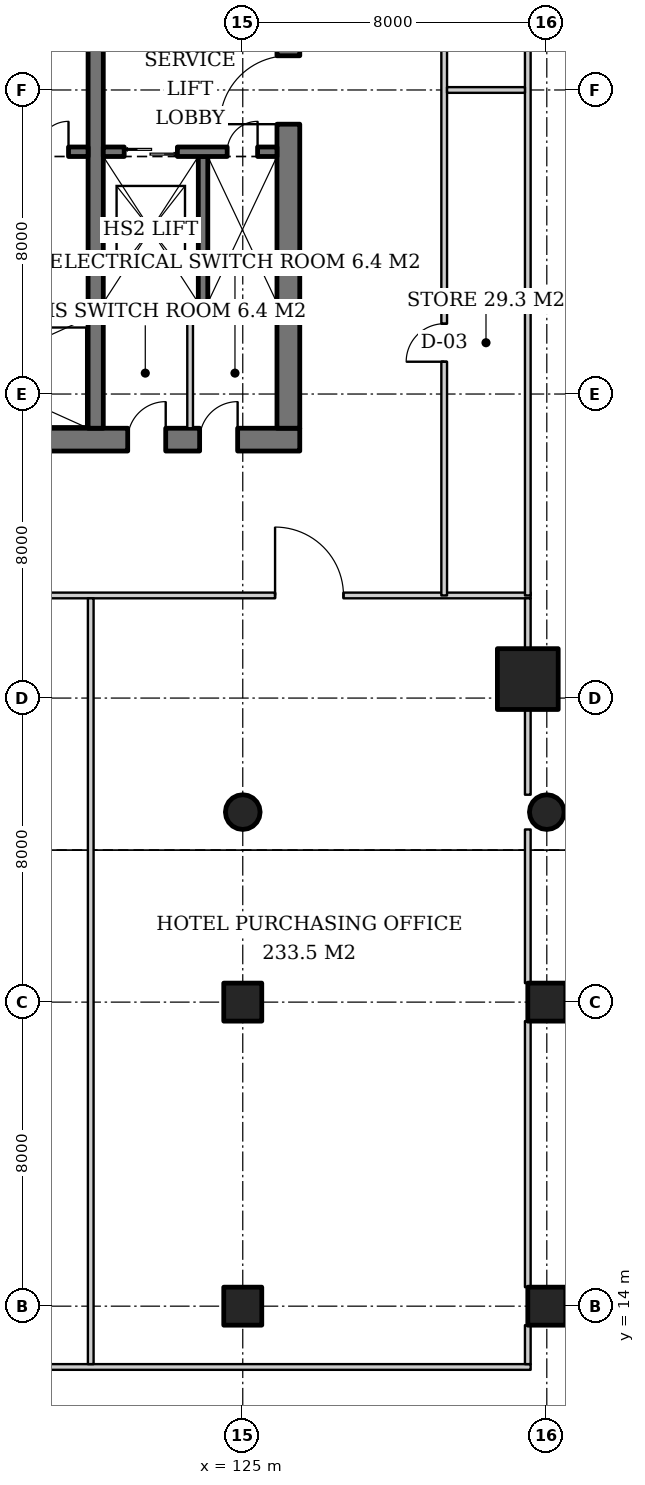
"""IFC4 building model, lengths in metres.
Left out: names, types, materials, properties, quantities, classifications, styles, units other than length and angle.
Written with IfcOpenShell. Run it as: python <this file> out.ifc"""

import sys

from ifc_helpers import new_model, si_unit, direction, frame, frame_2d, origin, origin_2d, place, context, subcontext, project, spatial, rectangle, hollow_circle, extrude, element, fill, save


model = new_model("IFC4")
c1 = context("Model", 3, precision=1e-05, world=origin(), true_north=direction((0.0, 1.0)))
c2 = subcontext(c1, "Body", "Model", "MODEL_VIEW")
j1 = project(units=[si_unit("LENGTHUNIT", "METRE"), si_unit("PLANEANGLEUNIT", "RADIAN")], contexts=[c1])
p1 = place(None, origin())
s1 = spatial("IfcSite", under=j1, at=p1, CompositionType="ELEMENT")
p2 = place(p1, origin())
s2 = spatial("IfcBuilding", under=s1, at=p2, CompositionType="ELEMENT")
p3 = place(p2, frame((0.0, 0.0, -5.0)))
s3 = spatial("IfcBuildingStorey", under=s2, at=p3, CompositionType="ELEMENT", Elevation=-5.0)
for number, where, z_axis, x_axis in (
    (1, (125.0, 14.0, 0.0), (0.0, 0.0, 1.0), (1.0, 0.0, 0.0)),
    (2, (125.0, 22.0, 0.0), (0.0, 0.0, 1.0), (1.0, 0.0, 0.0)),
    (3, (133.0, 14.0, 0.0), (0.0, 0.0, 1.0), (1.0, 0.0, 0.0)),
    (4, (133.0, 22.0, 0.0), (0.0, 0.0, 1.0), (1.0, 0.0, 0.0)),
):
    element("IfcColumn", number, at=place(p3, frame(where, z_axis=z_axis, x_axis=x_axis)), inside=s3, PredefinedType="COLUMN", context=c2, shape_type="SweptSolid", body=[
        extrude(rectangle(XDim=1.0, YDim=1.0, at=origin_2d()), origin(), (0.0, 0.0, 1.0), 5.0),
    ])
p4 = place(p3, frame((132.5, 30.5, 0.0), z_axis=(0.0, 0.0, 1.0), x_axis=(1.0, 0.0, 0.0)))
e5 = element("IfcColumn", 5, at=p4, inside=s3, PredefinedType="COLUMN", context=c2, shape_type="SweptSolid", body=[
    extrude(rectangle(XDim=1.6, YDim=1.6, at=origin_2d()), origin(), (0.0, 0.0, 1.0), 5.0),
])
for number, where, z_axis, x_axis in (
    (6, (133.0, 27.0, 0.0), (0.0, 0.0, 1.0), (1.0, 0.0, 0.0)),
    (7, (125.0, 27.0, 0.0), (0.0, 0.0, 1.0), (1.0, 0.0, 0.0)),
):
    element("IfcColumn", number, at=place(p3, frame(where, z_axis=z_axis, x_axis=x_axis)), inside=s3, PredefinedType="COLUMN", context=c2, shape_type="SweptSolid", body=[
        extrude(hollow_circle(Radius=0.457, WallThickness=0.03, at=origin_2d()), origin(), (0.0, 0.0, 1.0), 5.0),
    ])
p5 = place(p3, frame((107.5, 36.8, 0.0), z_axis=(0.0, 0.0, 1.0), x_axis=(1.0, 0.0, 0.0)))
e8 = element("IfcWall", 8, at=p5, inside=s3, PredefinedType="SHEAR", context=c2, shape_type="SweptSolid", body=[
    extrude(rectangle(XDim=19.0, YDim=0.6, at=frame_2d((9.5, 0.0))), origin(), (0.0, 0.0, 1.0), 5.0),
])
p6 = place(p5, frame((3.9, 0.0, 0.0)))
e9 = element("IfcOpeningElement", 9, at=p6, cuts=e8, PredefinedType="OPENING", context=c2, shape_type="SweptSolid", body=[
    extrude(rectangle(XDim=1.0, YDim=2.1, at=frame_2d((0.5, 1.05))), frame((0.0, 0.31, 0.0), z_axis=(0.0, -1.0, 0.0), x_axis=(1.0, 0.0, 0.0)), (0.0, 0.0, 1.0), 0.62),
])
p7 = place(p5, frame((14.472, 0.0, 0.0)))
e10 = element("IfcOpeningElement", 10, at=p7, cuts=e8, PredefinedType="OPENING", context=c2, shape_type="SweptSolid", body=[
    extrude(rectangle(XDim=1.0, YDim=2.1, at=frame_2d((0.5, 1.05))), frame((0.0, 0.31, 0.0), z_axis=(0.0, -1.0, 0.0), x_axis=(1.0, 0.0, 0.0)), (0.0, 0.0, 1.0), 0.62),
])
p8 = place(p5, frame((16.365, 0.0, 0.0)))
e11 = element("IfcOpeningElement", 11, at=p8, cuts=e8, PredefinedType="OPENING", context=c2, shape_type="SweptSolid", body=[
    extrude(rectangle(XDim=1.0, YDim=2.1, at=frame_2d((0.5, 1.05))), frame((0.0, 0.31, 0.0), z_axis=(0.0, -1.0, 0.0), x_axis=(1.0, 0.0, 0.0)), (0.0, 0.0, 1.0), 0.62),
])
p9 = place(p3, frame((126.2, 37.1, 0.0), z_axis=(0.0, 0.0, 1.0), x_axis=(0.0, 1.0, 0.0)))
e12 = element("IfcWall", 12, at=p9, inside=s3, PredefinedType="SHEAR", context=c2, shape_type="SweptSolid", body=[
    extrude(rectangle(XDim=17.8, YDim=0.6, at=frame_2d((8.9, 0.0))), origin(), (0.0, 0.0, 1.0), 5.0),
])
p10 = place(p9, frame((8.0, 0.0, 0.0)))
e13 = element("IfcOpeningElement", 13, at=p10, cuts=e12, PredefinedType="OPENING", context=c2, shape_type="SweptSolid", body=[
    extrude(rectangle(XDim=1.8, YDim=2.4, at=frame_2d((0.9, 1.2))), frame((0.0, 0.31, 0.0), z_axis=(0.0, -1.0, 0.0), x_axis=(1.0, 0.0, 0.0)), (0.0, 0.0, 1.0), 0.62),
])
p11 = place(p3, frame((108.1, 40.2, 0.0), z_axis=(0.0, 0.0, 1.0), x_axis=(1.0, 0.0, 0.0)))
e14 = element("IfcWall", 14, at=p11, inside=s3, PredefinedType="SHEAR", context=c2, shape_type="SweptSolid", body=[
    extrude(rectangle(XDim=17.8, YDim=0.4, at=frame_2d((8.9, 0.0))), origin(), (0.0, 0.0, 1.0), 5.0),
])
p12 = place(p3, frame((121.13, 37.1, 0.0), z_axis=(0.0, 0.0, 1.0), x_axis=(0.0, 1.0, 0.0)))
e15 = element("IfcWall", 15, at=p12, inside=s3, PredefinedType="SHEAR", context=c2, shape_type="SweptSolid", body=[
    extrude(rectangle(XDim=2.9, YDim=0.4, at=frame_2d((1.45, 0.0))), origin(), (0.0, 0.0, 1.0), 5.0),
])
p13 = place(p3, frame((121.13, 40.4, 0.0), z_axis=(0.0, 0.0, 1.0), x_axis=(0.0, 1.0, 0.0)))
e16 = element("IfcWall", 16, at=p13, inside=s3, PredefinedType="SHEAR", context=c2, shape_type="SweptSolid", body=[
    extrude(rectangle(XDim=11.2, YDim=0.4, at=frame_2d((5.6, 0.0))), origin(), (0.0, 0.0, 1.0), 5.0),
])
p14 = place(p3, frame((108.1, 44.375, 0.0), z_axis=(0.0, 0.0, 1.0), x_axis=(1.0, 0.0, 0.0)))
e17 = element("IfcWall", 17, at=p14, inside=s3, PredefinedType="SHEAR", context=c2, shape_type="SweptSolid", body=[
    extrude(rectangle(XDim=12.83, YDim=0.25, at=frame_2d((6.415, 0.0))), origin(), (0.0, 0.0, 1.0), 5.0),
])
p15 = place(p14, frame((0.7, 0.0, 0.0)))
e18 = element("IfcOpeningElement", 18, at=p15, cuts=e17, PredefinedType="OPENING", context=c2, shape_type="SweptSolid", body=[
    extrude(rectangle(XDim=1.1, YDim=2.2, at=frame_2d((0.55, 1.1))), frame((0.0, 0.135, 0.0), z_axis=(0.0, -1.0, 0.0), x_axis=(1.0, 0.0, 0.0)), (0.0, 0.0, 1.0), 0.27),
])
p16 = place(p14, frame((3.45, 0.0, 0.0)))
e19 = element("IfcOpeningElement", 19, at=p16, cuts=e17, PredefinedType="OPENING", context=c2, shape_type="SweptSolid", body=[
    extrude(rectangle(XDim=1.1, YDim=2.2, at=frame_2d((0.55, 1.1))), frame((0.0, 0.135, 0.0), z_axis=(0.0, -1.0, 0.0), x_axis=(1.0, 0.0, 0.0)), (0.0, 0.0, 1.0), 0.27),
])
p17 = place(p14, frame((6.2, 0.0, 0.0)))
e20 = element("IfcOpeningElement", 20, at=p17, cuts=e17, PredefinedType="OPENING", context=c2, shape_type="SweptSolid", body=[
    extrude(rectangle(XDim=1.1, YDim=2.2, at=frame_2d((0.55, 1.1))), frame((0.0, 0.135, 0.0), z_axis=(0.0, -1.0, 0.0), x_axis=(1.0, 0.0, 0.0)), (0.0, 0.0, 1.0), 0.27),
])
p18 = place(p14, frame((9.0, 0.0, 0.0)))
e21 = element("IfcOpeningElement", 21, at=p18, cuts=e17, PredefinedType="OPENING", context=c2, shape_type="SweptSolid", body=[
    extrude(rectangle(XDim=1.0, YDim=2.1, at=frame_2d((0.5, 1.05))), frame((0.0, 0.135, 0.0), z_axis=(0.0, -1.0, 0.0), x_axis=(1.0, 0.0, 0.0)), (0.0, 0.0, 1.0), 0.27),
])
p19 = place(p14, frame((11.515, 0.0, 0.0)))
e22 = element("IfcOpeningElement", 22, at=p19, cuts=e17, PredefinedType="OPENING", context=c2, shape_type="SweptSolid", body=[
    extrude(rectangle(XDim=0.8, YDim=2.0, at=frame_2d((0.4, 1.0))), frame((0.0, 0.135, 0.0), z_axis=(0.0, -1.0, 0.0), x_axis=(1.0, 0.0, 0.0)), (0.0, 0.0, 1.0), 0.27),
])
p20 = place(p3, frame((123.955, 44.25, 0.0), z_axis=(0.0, 0.0, 1.0), x_axis=(0.0, -1.0, 0.0)))
e23 = element("IfcWall", 23, at=p20, inside=s3, PredefinedType="SHEAR", context=c2, shape_type="SweptSolid", body=[
    extrude(rectangle(XDim=3.85, YDim=0.25, at=frame_2d((1.925, 0.0))), origin(), (0.0, 0.0, 1.0), 5.0),
])
p21 = place(p3, frame((121.33, 44.375, 0.0), z_axis=(0.0, 0.0, 1.0), x_axis=(1.0, 0.0, 0.0)))
e24 = element("IfcWall", 24, at=p21, inside=s3, PredefinedType="SHEAR", context=c2, shape_type="SweptSolid", body=[
    extrude(rectangle(XDim=4.57, YDim=0.25, at=frame_2d((2.285, 0.0))), origin(), (0.0, 0.0, 1.0), 5.0),
])
p22 = place(p21, frame((0.55, 0.0, 0.0)))
e25 = element("IfcOpeningElement", 25, at=p22, cuts=e24, PredefinedType="OPENING", context=c2, shape_type="SweptSolid", body=[
    extrude(rectangle(XDim=1.4, YDim=2.4, at=frame_2d((0.7, 1.2))), frame((0.0, 0.135, 0.0), z_axis=(0.0, -1.0, 0.0), x_axis=(1.0, 0.0, 0.0)), (0.0, 0.0, 1.0), 0.27),
])
p23 = place(p21, frame((3.26, 0.0, 0.0)))
e26 = element("IfcOpeningElement", 26, at=p23, cuts=e24, PredefinedType="OPENING", context=c2, shape_type="SweptSolid", body=[
    extrude(rectangle(XDim=0.8, YDim=2.0, at=frame_2d((0.4, 1.0))), frame((0.0, 0.135, 0.0), z_axis=(0.0, -1.0, 0.0), x_axis=(1.0, 0.0, 0.0)), (0.0, 0.0, 1.0), 0.27),
])
p24 = place(p3, frame((123.615, 37.1, 0.0), z_axis=(0.0, 0.0, 1.0), x_axis=(0.0, 1.0, 0.0)))
e27 = element("IfcWall", 27, at=p24, inside=s3, PredefinedType="SOLIDWALL", context=c2, shape_type="SweptSolid", body=[
    extrude(rectangle(XDim=2.9, YDim=0.15, at=frame_2d((1.45, 0.0))), origin(), (0.0, 0.0, 1.0), 4.7),
])
p25 = place(p3, frame((97.425, 12.4, 0.0), z_axis=(0.0, 0.0, 1.0), x_axis=(1.0, 0.0, 0.0)))
e28 = element("IfcWall", 28, at=p25, inside=s3, PredefinedType="PARTITIONING", context=c2, shape_type="SweptSolid", body=[
    extrude(rectangle(XDim=35.15, YDim=0.15, at=frame_2d((17.575, 0.0))), origin(), (0.0, 0.0, 1.0), 4.6),
])
p26 = place(p3, frame((97.425, 32.7, 0.0), z_axis=(0.0, 0.0, 1.0), x_axis=(1.0, 0.0, 0.0)))
e29 = element("IfcWall", 29, at=p26, inside=s3, PredefinedType="PARTITIONING", context=c2, shape_type="SweptSolid", body=[
    extrude(rectangle(XDim=35.15, YDim=0.15, at=frame_2d((17.575, 0.0))), origin(), (0.0, 0.0, 1.0), 3.9),
])
p27 = place(p26, frame((7.195, 0.0, 0.0)))
e30 = element("IfcOpeningElement", 30, at=p27, cuts=e29, PredefinedType="OPENING", context=c2, shape_type="SweptSolid", body=[
    extrude(rectangle(XDim=1.8, YDim=2.4, at=frame_2d((0.9, 1.2))), frame((0.0, 0.085, 0.0), z_axis=(0.0, -1.0, 0.0), x_axis=(1.0, 0.0, 0.0)), (0.0, 0.0, 1.0), 0.17),
])
p28 = place(p26, frame((15.675, 0.0, 0.0)))
e31 = element("IfcOpeningElement", 31, at=p28, cuts=e29, PredefinedType="OPENING", context=c2, shape_type="SweptSolid", body=[
    extrude(rectangle(XDim=1.8, YDim=2.4, at=frame_2d((0.9, 1.2))), frame((0.0, 0.085, 0.0), z_axis=(0.0, -1.0, 0.0), x_axis=(1.0, 0.0, 0.0)), (0.0, 0.0, 1.0), 0.17),
])
p29 = place(p26, frame((28.425, 0.0, 0.0)))
e32 = element("IfcOpeningElement", 32, at=p29, cuts=e29, PredefinedType="OPENING", context=c2, shape_type="SweptSolid", body=[
    extrude(rectangle(XDim=1.8, YDim=2.4, at=frame_2d((0.9, 1.2))), frame((0.0, 0.085, 0.0), z_axis=(0.0, -1.0, 0.0), x_axis=(1.0, 0.0, 0.0)), (0.0, 0.0, 1.0), 0.17),
])
p30 = place(p3, frame((132.5, 12.475, 0.0), z_axis=(0.0, 0.0, 1.0), x_axis=(0.0, 1.0, 0.0)))
e33 = element("IfcWall", 33, at=p30, inside=s3, PredefinedType="PARTITIONING", context=c2, shape_type="SweptSolid", body=[
    extrude(rectangle(XDim=1.025, YDim=0.15, at=frame_2d((0.512, 0.0))), origin(), (0.0, 0.0, 1.0), 4.6),
])
p31 = place(p3, frame((132.5, 14.5, 0.0), z_axis=(0.0, 0.0, 1.0), x_axis=(0.0, 1.0, 0.0)))
e34 = element("IfcWall", 34, at=p31, inside=s3, PredefinedType="PARTITIONING", context=c2, shape_type="SweptSolid", body=[
    extrude(rectangle(XDim=7.0, YDim=0.15, at=frame_2d((3.5, 0.0))), origin(), (0.0, 0.0, 1.0), 4.6),
])
p32 = place(p3, frame((132.5, 22.5, 0.0), z_axis=(0.0, 0.0, 1.0), x_axis=(0.0, 1.0, 0.0)))
e35 = element("IfcWall", 35, at=p32, inside=s3, PredefinedType="PARTITIONING", context=c2, shape_type="SweptSolid", body=[
    extrude(rectangle(XDim=4.043, YDim=0.15, at=frame_2d((2.021, 0.0))), origin(), (0.0, 0.0, 1.0), 4.6),
])
p33 = place(p3, frame((132.5, 27.457, 0.0), z_axis=(0.0, 0.0, 1.0), x_axis=(0.0, 1.0, 0.0)))
e36 = element("IfcWall", 36, at=p33, inside=s3, PredefinedType="PARTITIONING", context=c2, shape_type="SweptSolid", body=[
    extrude(rectangle(XDim=2.243, YDim=0.15, at=frame_2d((1.122, 0.0))), origin(), (0.0, 0.0, 1.0), 4.3),
])
p34 = place(p3, frame((132.5, 31.3, 0.0), z_axis=(0.0, 0.0, 1.0), x_axis=(0.0, 1.0, 0.0)))
e37 = element("IfcWall", 37, at=p34, inside=s3, PredefinedType="PARTITIONING", context=c2, shape_type="SweptSolid", body=[
    extrude(rectangle(XDim=1.325, YDim=0.15, at=frame_2d((0.663, 0.0))), origin(), (0.0, 0.0, 1.0), 4.7),
])
p35 = place(p3, frame((121.0, 12.475, 0.0), z_axis=(0.0, 0.0, 1.0), x_axis=(0.0, 1.0, 0.0)))
e38 = element("IfcWall", 38, at=p35, inside=s3, PredefinedType="PARTITIONING", context=c2, shape_type="SweptSolid", body=[
    extrude(rectangle(XDim=20.15, YDim=0.15, at=frame_2d((10.075, 0.0))), origin(), (0.0, 0.0, 1.0), 4.15),
])
p36 = place(p3, frame((130.3, 32.7, 0.0), z_axis=(0.0, 0.0, 1.0), x_axis=(0.0, 1.0, 0.0)))
e39 = element("IfcWall", 39, at=p36, inside=s3, PredefinedType="PARTITIONING", context=c2, shape_type="SweptSolid", body=[
    extrude(rectangle(XDim=26.6, YDim=0.15, at=frame_2d((13.3, 0.0))), origin(), (0.0, 0.0, 1.0), 3.9),
])
p37 = place(p36, frame((6.15, 0.0, 0.0)))
e40 = element("IfcOpeningElement", 40, at=p37, cuts=e39, PredefinedType="OPENING", context=c2, shape_type="SweptSolid", body=[
    extrude(rectangle(XDim=1.0, YDim=2.1, at=frame_2d((0.5, 1.05))), frame((0.0, 0.085, 0.0), z_axis=(0.0, -1.0, 0.0), x_axis=(1.0, 0.0, 0.0)), (0.0, 0.0, 1.0), 0.17),
])
p38 = place(p36, frame((19.45, 0.0, 0.0)))
e41 = element("IfcOpeningElement", 41, at=p38, cuts=e39, PredefinedType="OPENING", context=c2, shape_type="SweptSolid", body=[
    extrude(rectangle(XDim=1.0, YDim=2.1, at=frame_2d((0.5, 1.05))), frame((0.0, 0.085, 0.0), z_axis=(0.0, -1.0, 0.0), x_axis=(1.0, 0.0, 0.0)), (0.0, 0.0, 1.0), 0.17),
])
p39 = place(p3, frame((132.5, 32.7, 0.0), z_axis=(0.0, 0.0, 1.0), x_axis=(0.0, 1.0, 0.0)))
e42 = element("IfcWall", 42, at=p39, inside=s3, PredefinedType="PARTITIONING", context=c2, shape_type="SweptSolid", body=[
    extrude(rectangle(XDim=26.6, YDim=0.15, at=frame_2d((13.3, 0.0))), origin(), (0.0, 0.0, 1.0), 3.9),
])
p40 = place(p3, frame((130.375, 46.0, 0.0), z_axis=(0.0, 0.0, 1.0), x_axis=(1.0, 0.0, 0.0)))
e43 = element("IfcWall", 43, at=p40, inside=s3, PredefinedType="PARTITIONING", context=c2, shape_type="SweptSolid", body=[
    extrude(rectangle(XDim=2.05, YDim=0.15, at=frame_2d((1.025, 0.0))), origin(), (0.0, 0.0, 1.0), 4.7),
])
p41 = place(p19, origin())
e44 = element("IfcDoor", 44, at=p41, inside=s3, OperationType="SINGLE_SWING_RIGHT", PredefinedType="DOOR", context=c2, shape_type="SweptSolid", body=[
    extrude(rectangle(XDim=0.8, YDim=2.0, at=frame_2d((0.4, 1.0))), frame((0.0, 0.025, 0.0), z_axis=(0.0, -1.0, 0.0), x_axis=(1.0, 0.0, 0.0)), (0.0, 0.0, 1.0), 0.05),
])
fill(e22, e44)
p42 = place(p22, origin())
e45 = element("IfcDoor", 45, at=p42, inside=s3, OperationType="DOUBLE_DOOR_SLIDING", PredefinedType="DOOR", context=c2, shape_type="SweptSolid", body=[
    extrude(rectangle(XDim=1.4, YDim=2.4, at=frame_2d((0.7, 1.2))), frame((0.0, 0.025, 0.0), z_axis=(0.0, -1.0, 0.0), x_axis=(1.0, 0.0, 0.0)), (0.0, 0.0, 1.0), 0.05),
])
fill(e25, e45)
p43 = place(p23, origin())
e46 = element("IfcDoor", 46, at=p43, inside=s3, OperationType="SINGLE_SWING_RIGHT", PredefinedType="DOOR", context=c2, shape_type="SweptSolid", body=[
    extrude(rectangle(XDim=0.8, YDim=2.0, at=frame_2d((0.4, 1.0))), frame((0.0, 0.025, 0.0), z_axis=(0.0, -1.0, 0.0), x_axis=(1.0, 0.0, 0.0)), (0.0, 0.0, 1.0), 0.05),
])
fill(e26, e46)
p44 = place(p10, origin())
e47 = element("IfcDoor", 47, at=p44, inside=s3, OperationType="DOUBLE_DOOR_SINGLE_SWING", PredefinedType="DOOR", context=c2, shape_type="SweptSolid", body=[
    extrude(rectangle(XDim=1.8, YDim=2.4, at=frame_2d((0.9, 1.2))), frame((0.0, 0.025, 0.0), z_axis=(0.0, -1.0, 0.0), x_axis=(1.0, 0.0, 0.0)), (0.0, 0.0, 1.0), 0.05),
])
fill(e13, e47)
p45 = place(p7, origin())
e48 = element("IfcDoor", 48, at=p45, inside=s3, OperationType="SINGLE_SWING_RIGHT", PredefinedType="DOOR", context=c2, shape_type="SweptSolid", body=[
    extrude(rectangle(XDim=1.0, YDim=2.1, at=frame_2d((0.5, 1.05))), frame((0.0, 0.29, 0.0), z_axis=(0.0, -1.0, 0.0), x_axis=(1.0, 0.0, 0.0)), (0.0, 0.0, 1.0), 0.05),
])
fill(e10, e48)
p46 = place(p8, origin())
e49 = element("IfcDoor", 49, at=p46, inside=s3, OperationType="SINGLE_SWING_RIGHT", PredefinedType="DOOR", context=c2, shape_type="SweptSolid", body=[
    extrude(rectangle(XDim=1.0, YDim=2.1, at=frame_2d((0.5, 1.05))), frame((0.0, 0.29, 0.0), z_axis=(0.0, -1.0, 0.0), x_axis=(1.0, 0.0, 0.0)), (0.0, 0.0, 1.0), 0.05),
])
fill(e11, e49)
p47 = place(p29, origin())
e50 = element("IfcDoor", 50, at=p47, inside=s3, OperationType="DOUBLE_DOOR_SINGLE_SWING", PredefinedType="DOOR", context=c2, shape_type="SweptSolid", body=[
    extrude(rectangle(XDim=1.8, YDim=2.4, at=frame_2d((0.9, 1.2))), frame((0.0, 0.025, 0.0), z_axis=(0.0, -1.0, 0.0), x_axis=(1.0, 0.0, 0.0)), (0.0, 0.0, 1.0), 0.05),
])
fill(e32, e50)
p48 = place(p37, origin())
e51 = element("IfcDoor", 51, at=p48, inside=s3, OperationType="SINGLE_SWING_LEFT", PredefinedType="DOOR", context=c2, shape_type="SweptSolid", body=[
    extrude(rectangle(XDim=1.0, YDim=2.1, at=frame_2d((0.5, 1.05))), frame((0.0, 0.025, 0.0), z_axis=(0.0, -1.0, 0.0), x_axis=(1.0, 0.0, 0.0)), (0.0, 0.0, 1.0), 0.05),
])
fill(e40, e51)
save(model, sys.argv[1])
